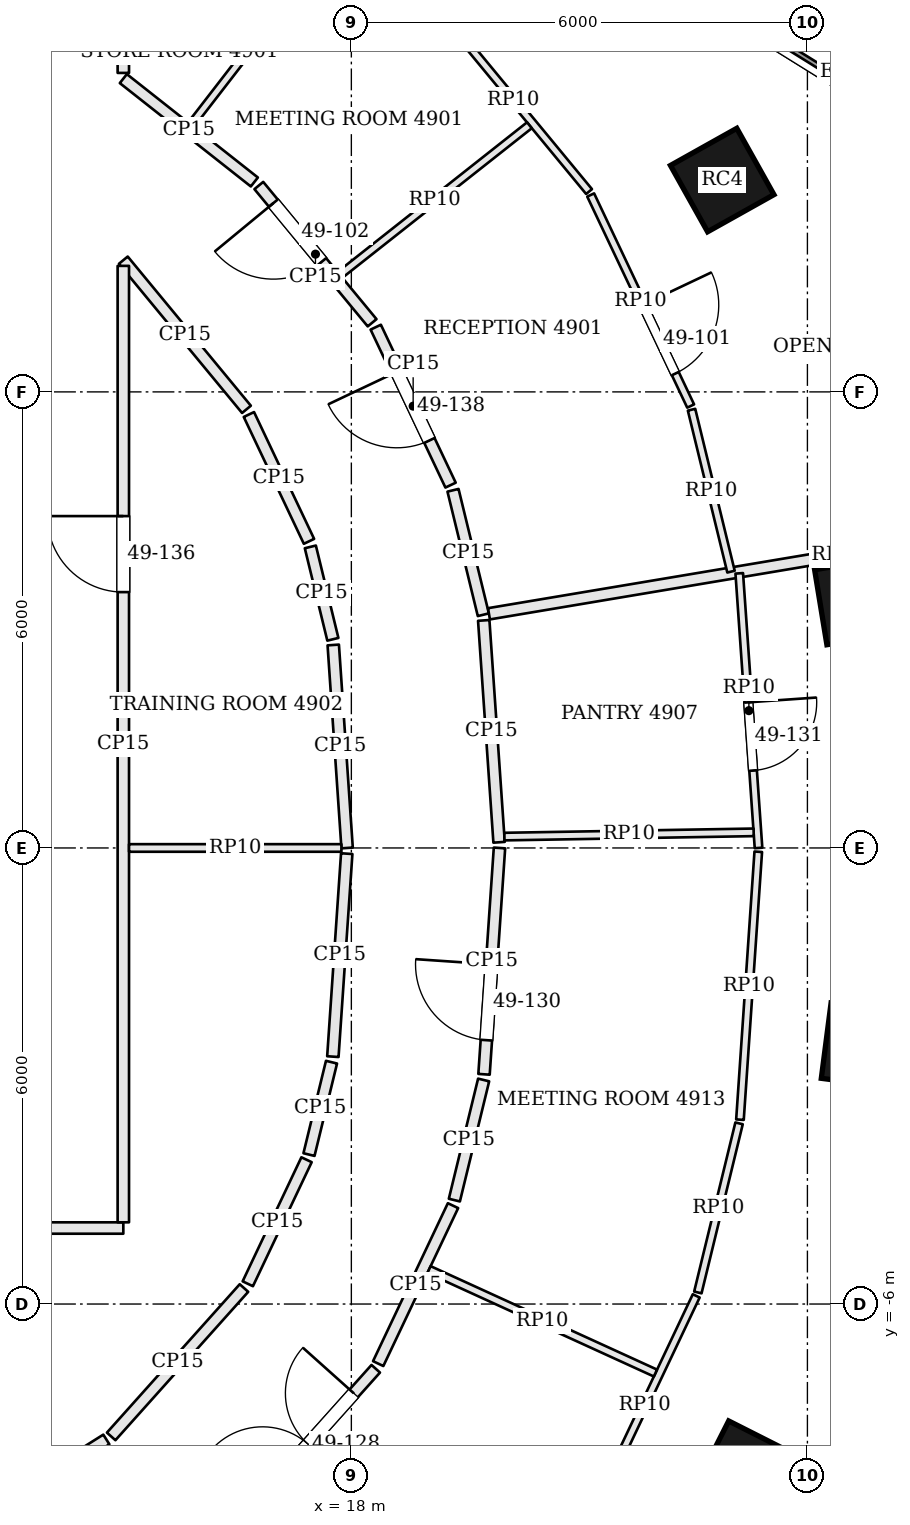
"""IFC4 building model, lengths in metres.
Left out: names, types, materials, properties, quantities, classifications, styles, units other than length and angle.
Written with IfcOpenShell. Run it as: python <this file> out.ifc"""

import sys

from ifc_helpers import new_model, si_unit, direction, frame, frame_2d, origin, origin_2d, place, context, subcontext, project, spatial, rectangle, extrude, element, fill, save


model = new_model("IFC4")
c1 = context("Model", 3, precision=1e-05, world=origin(), true_north=direction((0.0, 1.0)))
c2 = subcontext(c1, "Body", "Model", "MODEL_VIEW")
j1 = project(units=[si_unit("LENGTHUNIT", "METRE"), si_unit("PLANEANGLEUNIT", "RADIAN")], contexts=[c1])
p1 = place(None, origin())
s1 = spatial("IfcSite", under=j1, at=p1, CompositionType="ELEMENT")
p2 = place(p1, origin())
s2 = spatial("IfcBuilding", under=s1, at=p2, CompositionType="ELEMENT")
p3 = place(p2, frame((0.0, 0.0, 201.3)))
s3 = spatial("IfcBuildingStorey", under=s2, at=p3, CompositionType="ELEMENT", Elevation=201.3)
for number, where, z_axis, x_axis in (
    (1, (24.669, 3.248, 0.0), (0.0, 0.0, 1.0), (-0.162, 0.987, 0.0)),
    (2, (22.879, 8.787, 0.0), (0.0, 0.0, 1.0), (-0.489, 0.873, 0.0)),
    (3, (23.185, -8.21, 0.0), (0.0, 0.0, 1.0), (0.451, 0.893, 0.0)),
    (4, (24.743, -2.599, 0.0), (0.0, 0.0, 1.0), (0.128, 0.992, 0.0)),
):
    element("IfcColumn", number, at=place(p3, frame(where, z_axis=z_axis, x_axis=x_axis)), inside=s3, PredefinedType="COLUMN", context=c2, shape_type="SweptSolid", body=[
        extrude(rectangle(XDim=1.0, YDim=1.0, at=origin_2d()), origin(), (0.0, 0.0, 1.0), 3.9),
    ])
p4 = place(p3, frame((27.016, 8.626, 0.0), z_axis=(0.0, 0.0, 1.0), x_axis=(-0.849198377377, 0.528073968172, 0.0)))
e5 = element("IfcWall", 5, at=p4, inside=s3, PredefinedType="SOLIDWALL", context=c2, shape_type="SweptSolid", body=[
    extrude(rectangle(XDim=5.99, YDim=0.45, at=frame_2d((2.995, 0.0))), origin(), (0.0, 0.0, 1.0), 3.7),
])
p5 = place(p4, frame((2.095, 0.0, 0.9)))
e6 = element("IfcOpeningElement", 6, at=p5, cuts=e5, PredefinedType="OPENING", context=c2, shape_type="SweptSolid", body=[
    extrude(rectangle(XDim=1.8, YDim=2.3, at=frame_2d((0.9, 1.15))), frame((0.0, 0.235, 0.0), z_axis=(0.0, -1.0, 0.0), x_axis=(1.0, 0.0, 0.0)), (0.0, 0.0, 1.0), 0.47),
])
p6 = place(p3, frame((26.965, 8.746, 3.9), z_axis=(0.0, 0.0, 1.0), x_axis=(-0.849203312007, 0.528066032686, 0.0)))
e7 = element("IfcWall", 7, at=p6, inside=s3, PredefinedType="PARAPET", context=c2, shape_type="SweptSolid", body=[
    extrude(rectangle(XDim=4.113, YDim=0.3, at=frame_2d((2.056, 0.0))), origin(), (0.0, 0.0, 1.0), 1.1),
])
p7 = place(p3, frame((19.736, 3.068, 0.0), z_axis=(0.0, 0.0, 1.0), x_axis=(-0.236736045641, 0.971574003715, 0.0)))
e8 = element("IfcWall", 8, at=p7, inside=s3, PredefinedType="PARTITIONING", context=c2, shape_type="SweptSolid", body=[
    extrude(rectangle(XDim=1.685, YDim=0.15, at=frame_2d((0.843, 0.0))), origin(), (0.0, 0.0, 1.0), 3.084),
])
p8 = place(p3, frame((19.305, 4.773, 0.0), z_axis=(0.0, 0.0, 1.0), x_axis=(-0.428173054138, 0.903696760927, 0.0)))
e9 = element("IfcWall", 9, at=p8, inside=s3, PredefinedType="PARTITIONING", context=c2, shape_type="SweptSolid", body=[
    extrude(rectangle(XDim=2.3, YDim=0.15, at=frame_2d((1.15, 0.0))), origin(), (0.0, 0.0, 1.0), 3.084),
])
p9 = place(p8, frame((0.65, 0.0, 0.0)))
e10 = element("IfcOpeningElement", 10, at=p9, cuts=e9, PredefinedType="OPENING", context=c2, shape_type="SweptSolid", body=[
    extrude(rectangle(XDim=1.0, YDim=2.1, at=frame_2d((0.5, 1.05))), frame((0.0, 0.085, 0.0), z_axis=(0.0, -1.0, 0.0), x_axis=(1.0, 0.0, 0.0)), (0.0, 0.0, 1.0), 0.17),
])
p10 = place(p3, frame((18.273, 6.909, 0.0), z_axis=(0.0, 0.0, 1.0), x_axis=(-0.63653648943, 0.771246586783, 0.0)))
e11 = element("IfcWall", 11, at=p10, inside=s3, PredefinedType="PARTITIONING", context=c2, shape_type="SweptSolid", body=[
    extrude(rectangle(XDim=2.342, YDim=0.15, at=frame_2d((1.171, 0.0))), origin(), (0.0, 0.0, 1.0), 3.084),
])
p11 = place(p10, frame((1.041, 0.0, 0.0)))
e12 = element("IfcOpeningElement", 12, at=p11, cuts=e11, PredefinedType="OPENING", context=c2, shape_type="SweptSolid", body=[
    extrude(rectangle(XDim=1.0, YDim=2.4, at=frame_2d((0.5, 1.2))), frame((0.0, 0.085, 0.0), z_axis=(0.0, -1.0, 0.0), x_axis=(1.0, 0.0, 0.0)), (0.0, 0.0, 1.0), 0.17),
])
p12 = place(p3, frame((16.724, 8.761, 0.0), z_axis=(0.0, 0.0, 1.0), x_axis=(-0.785124633057, 0.619337800047, 0.0)))
e13 = element("IfcWall", 13, at=p12, inside=s3, PredefinedType="PARTITIONING", context=c2, shape_type="SweptSolid", body=[
    extrude(rectangle(XDim=2.196, YDim=0.15, at=frame_2d((1.098, 0.0))), origin(), (0.0, 0.0, 1.0), 3.084),
])
p13 = place(p3, frame((15.0, 10.196, 0.0), z_axis=(0.0, 0.0, 1.0), x_axis=(0.0, 1.0, 0.0)))
e14 = element("IfcWall", 14, at=p13, inside=s3, PredefinedType="PARTITIONING", context=c2, shape_type="SweptSolid", body=[
    extrude(rectangle(XDim=3.804, YDim=0.15, at=frame_2d((1.902, 0.0))), origin(), (0.0, 0.0, 1.0), 3.084),
])
p14 = place(p13, frame((1.097, 0.0, 0.0)))
e15 = element("IfcOpeningElement", 15, at=p14, cuts=e14, PredefinedType="OPENING", context=c2, shape_type="SweptSolid", body=[
    extrude(rectangle(XDim=1.0, YDim=2.4, at=frame_2d((0.5, 1.2))), frame((0.0, 0.085, 0.0), z_axis=(0.0, -1.0, 0.0), x_axis=(1.0, 0.0, 0.0)), (0.0, 0.0, 1.0), 0.17),
])
p15 = place(p3, frame((28.982, 4.62, 0.0), z_axis=(0.0, 0.0, 1.0), x_axis=(-0.986215974775, -0.165463141211, 0.0)))
e16 = element("IfcWall", 16, at=p15, inside=s3, PredefinedType="PARTITIONING", context=c2, shape_type="SweptSolid", body=[
    extrude(rectangle(XDim=9.3, YDim=0.15, at=frame_2d((4.65, 0.0))), origin(), (0.0, 0.0, 1.0), 3.084),
])
p16 = place(p3, frame((16.332, -9.074, 0.0), z_axis=(0.0, 0.0, 1.0), x_axis=(0.666900122351, 0.74514711756, 0.0)))
e17 = element("IfcWall", 17, at=p16, inside=s3, PredefinedType="PARTITIONING", context=c2, shape_type="SweptSolid", body=[
    extrude(rectangle(XDim=2.983, YDim=0.15, at=frame_2d((1.491, 0.0))), origin(), (0.0, 0.0, 1.0), 3.084),
])
p17 = place(p16, frame((0.75, 0.0, 0.0)))
e18 = element("IfcOpeningElement", 18, at=p17, cuts=e17, PredefinedType="OPENING", context=c2, shape_type="SweptSolid", body=[
    extrude(rectangle(XDim=1.8, YDim=2.1, at=frame_2d((0.9, 1.05))), frame((0.0, 0.085, 0.0), z_axis=(0.0, -1.0, 0.0), x_axis=(1.0, 0.0, 0.0)), (0.0, 0.0, 1.0), 0.17),
])
p18 = place(p3, frame((18.353, -6.784, 0.0), z_axis=(0.0, 0.0, 1.0), x_axis=(0.428086344739, 0.903737838894, 0.0)))
e19 = element("IfcWall", 19, at=p18, inside=s3, PredefinedType="PARTITIONING", context=c2, shape_type="SweptSolid", body=[
    extrude(rectangle(XDim=2.3, YDim=0.15, at=frame_2d((1.15, 0.0))), origin(), (0.0, 0.0, 1.0), 3.084),
])
p19 = place(p3, frame((19.355, -4.633, 0.0), z_axis=(0.0, 0.0, 1.0), x_axis=(0.236703930685, 0.971581828359, 0.0)))
e20 = element("IfcWall", 20, at=p19, inside=s3, PredefinedType="PARTITIONING", context=c2, shape_type="SweptSolid", body=[
    extrude(rectangle(XDim=1.626, YDim=0.15, at=frame_2d((0.813, 0.0))), origin(), (0.0, 0.0, 1.0), 3.084),
])
p20 = place(p3, frame((19.745, -2.978, 0.0), z_axis=(0.0, 0.0, 1.0), x_axis=(0.068142324, 0.997675610447, 0.0)))
e21 = element("IfcWall", 21, at=p20, inside=s3, PredefinedType="PARTITIONING", context=c2, shape_type="SweptSolid", body=[
    extrude(rectangle(XDim=2.984, YDim=0.15, at=frame_2d((1.492, 0.0))), origin(), (0.0, 0.0, 1.0), 3.084),
])
p21 = place(p20, frame((0.45, 0.0, 0.0)))
e22 = element("IfcOpeningElement", 22, at=p21, cuts=e21, PredefinedType="OPENING", context=c2, shape_type="SweptSolid", body=[
    extrude(rectangle(XDim=1.0, YDim=2.4, at=frame_2d((0.5, 1.2))), frame((0.0, 0.085, 0.0), z_axis=(0.0, -1.0, 0.0), x_axis=(1.0, 0.0, 0.0)), (0.0, 0.0, 1.0), 0.17),
])
p22 = place(p3, frame((19.944, 0.075, 0.0), z_axis=(0.0, 0.0, 1.0), x_axis=(-0.069011153465, 0.997615888355, 0.0)))
e23 = element("IfcWall", 23, at=p22, inside=s3, PredefinedType="PARTITIONING", context=c2, shape_type="SweptSolid", body=[
    extrude(rectangle(XDim=2.926, YDim=0.15, at=frame_2d((1.463, 0.0))), origin(), (0.0, 0.0, 1.0), 3.084),
])
p23 = place(p3, frame((15.0, 7.733, 0.0), z_axis=(0.0, 0.0, 1.0), x_axis=(0.636601263488, -0.771193121938, 0.0)))
e24 = element("IfcWall", 24, at=p23, inside=s3, PredefinedType="PARTITIONING", context=c2, shape_type="SweptSolid", body=[
    extrude(rectangle(XDim=2.545, YDim=0.15, at=frame_2d((1.272, 0.0))), origin(), (0.0, 0.0, 1.0), 3.084),
])
p24 = place(p3, frame((16.652, 5.702, 0.0), z_axis=(0.0, 0.0, 1.0), x_axis=(0.428126129773, -0.903718992279, 0.0)))
e25 = element("IfcWall", 25, at=p24, inside=s3, PredefinedType="PARTITIONING", context=c2, shape_type="SweptSolid", body=[
    extrude(rectangle(XDim=1.846, YDim=0.15, at=frame_2d((0.923, 0.0))), origin(), (0.0, 0.0, 1.0), 3.084),
])
p25 = place(p3, frame((17.46, 3.961, 0.0), z_axis=(0.0, 0.0, 1.0), x_axis=(0.236655249498, -0.971593687137, 0.0)))
e26 = element("IfcWall", 26, at=p25, inside=s3, PredefinedType="PARTITIONING", context=c2, shape_type="SweptSolid", body=[
    extrude(rectangle(XDim=1.251, YDim=0.15, at=frame_2d((0.626, 0.0))), origin(), (0.0, 0.0, 1.0), 3.084),
])
p26 = place(p3, frame((17.762, 2.67, 0.0), z_axis=(0.0, 0.0, 1.0), x_axis=(0.068135311644, -0.997676089373, 0.0)))
e27 = element("IfcWall", 27, at=p26, inside=s3, PredefinedType="PARTITIONING", context=c2, shape_type="SweptSolid", body=[
    extrude(rectangle(XDim=2.677, YDim=0.15, at=frame_2d((1.338, 0.0))), origin(), (0.0, 0.0, 1.0), 3.084),
])
p27 = place(p3, frame((17.939, -0.075, 0.0), z_axis=(0.0, 0.0, 1.0), x_axis=(-0.068226099283, -0.99766988497, 0.0)))
e28 = element("IfcWall", 28, at=p27, inside=s3, PredefinedType="PARTITIONING", context=c2, shape_type="SweptSolid", body=[
    extrude(rectangle(XDim=2.677, YDim=0.15, at=frame_2d((1.338, 0.0))), origin(), (0.0, 0.0, 1.0), 3.084),
])
p28 = place(p3, frame((17.739, -2.818, 0.0), z_axis=(0.0, 0.0, 1.0), x_axis=(-0.236884307907, -0.971537865792, 0.0)))
e29 = element("IfcWall", 29, at=p28, inside=s3, PredefinedType="PARTITIONING", context=c2, shape_type="SweptSolid", body=[
    extrude(rectangle(XDim=1.251, YDim=0.15, at=frame_2d((0.625, 0.0))), origin(), (0.0, 0.0, 1.0), 3.084),
])
p29 = place(p3, frame((17.41, -4.102, 0.0), z_axis=(0.0, 0.0, 1.0), x_axis=(-0.428074720318, -0.903743345107, 0.0)))
e30 = element("IfcWall", 30, at=p29, inside=s3, PredefinedType="PARTITIONING", context=c2, shape_type="SweptSolid", body=[
    extrude(rectangle(XDim=1.806, YDim=0.15, at=frame_2d((0.903, 0.0))), origin(), (0.0, 0.0, 1.0), 3.084),
])
p30 = place(p3, frame((16.587, -5.789, 0.0), z_axis=(0.0, 0.0, 1.0), x_axis=(-0.666887460656, -0.745158449472, 0.0)))
e31 = element("IfcWall", 31, at=p30, inside=s3, PredefinedType="PARTITIONING", context=c2, shape_type="SweptSolid", body=[
    extrude(rectangle(XDim=2.62, YDim=0.15, at=frame_2d((1.31, 0.0))), origin(), (0.0, 0.0, 1.0), 3.084),
])
p31 = place(p3, frame((14.777, -7.781, 0.0), z_axis=(0.0, 0.0, 1.0), x_axis=(-0.846359741043, -0.532611667862, 0.0)))
e32 = element("IfcWall", 32, at=p31, inside=s3, PredefinedType="PARTITIONING", context=c2, shape_type="SweptSolid", body=[
    extrude(rectangle(XDim=2.987, YDim=0.15, at=frame_2d((1.494, 0.0))), origin(), (0.0, 0.0, 1.0), 3.084),
])
p32 = place(p3, frame((-14.925, -5.0, 0.0), z_axis=(0.0, 0.0, 1.0), x_axis=(1.0, 0.0, 0.0)))
e33 = element("IfcWall", 33, at=p32, inside=s3, PredefinedType="PARTITIONING", context=c2, shape_type="SweptSolid", body=[
    extrude(rectangle(XDim=29.925, YDim=0.15, at=frame_2d((14.962, 0.0))), origin(), (0.0, 0.0, 1.0), 3.084),
])
p33 = place(p32, frame((3.925, 0.0, 0.0)))
e34 = element("IfcOpeningElement", 34, at=p33, cuts=e33, PredefinedType="OPENING", context=c2, shape_type="SweptSolid", body=[
    extrude(rectangle(XDim=1.0, YDim=2.1, at=frame_2d((0.5, 1.05))), frame((0.0, 0.085, 0.0), z_axis=(0.0, -1.0, 0.0), x_axis=(1.0, 0.0, 0.0)), (0.0, 0.0, 1.0), 0.17),
])
p34 = place(p32, frame((14.025, 0.0, 0.0)))
e35 = element("IfcOpeningElement", 35, at=p34, cuts=e33, PredefinedType="OPENING", context=c2, shape_type="SweptSolid", body=[
    extrude(rectangle(XDim=1.8, YDim=2.1, at=frame_2d((0.9, 1.05))), frame((0.0, 0.085, 0.0), z_axis=(0.0, -1.0, 0.0), x_axis=(1.0, 0.0, 0.0)), (0.0, 0.0, 1.0), 0.17),
])
p35 = place(p32, frame((24.925, 0.0, 0.0)))
e36 = element("IfcOpeningElement", 36, at=p35, cuts=e33, PredefinedType="OPENING", context=c2, shape_type="SweptSolid", body=[
    extrude(rectangle(XDim=1.0, YDim=2.1, at=frame_2d((0.5, 1.05))), frame((0.0, 0.085, 0.0), z_axis=(0.0, -1.0, 0.0), x_axis=(1.0, 0.0, 0.0)), (0.0, 0.0, 1.0), 0.17),
])
p36 = place(p3, frame((15.0, -4.925, 0.0), z_axis=(0.0, 0.0, 1.0), x_axis=(0.0, 1.0, 0.0)))
e37 = element("IfcWall", 37, at=p36, inside=s3, PredefinedType="PARTITIONING", context=c2, shape_type="SweptSolid", body=[
    extrude(rectangle(XDim=12.583, YDim=0.15, at=frame_2d((6.292, 0.0))), origin(), (0.0, 0.0, 1.0), 3.084),
])
p37 = place(p36, frame((8.291, 0.0, 0.0)))
e38 = element("IfcOpeningElement", 38, at=p37, cuts=e37, PredefinedType="OPENING", context=c2, shape_type="SweptSolid", body=[
    extrude(rectangle(XDim=1.0, YDim=2.1, at=frame_2d((0.5, 1.05))), frame((0.0, 0.085, 0.0), z_axis=(0.0, -1.0, 0.0), x_axis=(1.0, 0.0, 0.0)), (0.0, 0.0, 1.0), 0.17),
])
p38 = place(p3, frame((19.135, 11.049, 0.0), z_axis=(0.0, 0.0, 1.0), x_axis=(0.636562826748, -0.771224848927, 0.0)))
e39 = element("IfcWall", 39, at=p38, inside=s3, PredefinedType="PARTITIONING", context=c2, shape_type="SweptSolid", body=[
    extrude(rectangle(XDim=3.129, YDim=0.1, at=frame_2d((1.564, 0.0))), origin(), (0.0, 0.0, 1.0), 3.084),
])
p39 = place(p3, frame((21.149, 8.59, 0.0), z_axis=(0.0, 0.0, 1.0), x_axis=(0.428134173248, -0.903715181734, 0.0)))
e40 = element("IfcWall", 40, at=p39, inside=s3, PredefinedType="PARTITIONING", context=c2, shape_type="SweptSolid", body=[
    extrude(rectangle(XDim=3.072, YDim=0.1, at=frame_2d((1.536, 0.0))), origin(), (0.0, 0.0, 1.0), 3.084),
])
p40 = place(p39, frame((1.6, 0.0, 0.0)))
e41 = element("IfcOpeningElement", 41, at=p40, cuts=e40, PredefinedType="OPENING", context=c2, shape_type="SweptSolid", body=[
    extrude(rectangle(XDim=1.0, YDim=2.1, at=frame_2d((0.5, 1.05))), frame((0.0, 0.06, 0.0), z_axis=(0.0, -1.0, 0.0), x_axis=(1.0, 0.0, 0.0)), (0.0, 0.0, 1.0), 0.12),
])
p41 = place(p3, frame((22.476, 5.765, 0.0), z_axis=(0.0, 0.0, 1.0), x_axis=(0.23684595195, -0.971547217095, 0.0)))
e42 = element("IfcWall", 42, at=p41, inside=s3, PredefinedType="PARTITIONING", context=c2, shape_type="SweptSolid", body=[
    extrude(rectangle(XDim=2.193, YDim=0.1, at=frame_2d((1.096, 0.0))), origin(), (0.0, 0.0, 1.0), 3.084),
])
p42 = place(p3, frame((17.85, 7.54, 0.0), z_axis=(0.0, 0.0, 1.0), x_axis=(0.784835535168, 0.619704109021, 0.0)))
e43 = element("IfcWall", 43, at=p42, inside=s3, PredefinedType="PARTITIONING", context=c2, shape_type="SweptSolid", body=[
    extrude(rectangle(XDim=3.176, YDim=0.1, at=frame_2d((1.588, 0.0))), origin(), (0.0, 0.0, 1.0), 3.084),
])
p43 = place(p3, frame((15.89, 9.515, 0.0), z_axis=(0.0, 0.0, 1.0), x_axis=(0.611483217527, 0.791257401028, 0.0)))
e44 = element("IfcWall", 44, at=p43, inside=s3, PredefinedType="PARTITIONING", context=c2, shape_type="SweptSolid", body=[
    extrude(rectangle(XDim=3.891, YDim=0.1, at=frame_2d((1.945, 0.0))), origin(), (0.0, 0.0, 1.0), 3.084),
])
p44 = place(p3, frame((23.103, 3.613, 0.0), z_axis=(0.0, 0.0, 1.0), x_axis=(0.069972683226, -0.997548907875, 0.0)))
e45 = element("IfcWall", 45, at=p44, inside=s3, PredefinedType="PARTITIONING", context=c2, shape_type="SweptSolid", body=[
    extrude(rectangle(XDim=3.622, YDim=0.1, at=frame_2d((1.811, 0.0))), origin(), (0.0, 0.0, 1.0), 3.084),
])
p45 = place(p44, frame((1.701, 0.0, 0.0)))
e46 = element("IfcOpeningElement", 46, at=p45, cuts=e45, PredefinedType="OPENING", context=c2, shape_type="SweptSolid", body=[
    extrude(rectangle(XDim=0.9, YDim=2.1, at=frame_2d((0.45, 1.05))), frame((0.0, 0.06, 0.0), z_axis=(0.0, -1.0, 0.0), x_axis=(1.0, 0.0, 0.0)), (0.0, 0.0, 1.0), 0.12),
])
p46 = place(p3, frame((23.354, -0.05, 0.0), z_axis=(0.0, 0.0, 1.0), x_axis=(-0.06820679361, -0.99767120501, 0.0)))
e47 = element("IfcWall", 47, at=p46, inside=s3, PredefinedType="PARTITIONING", context=c2, shape_type="SweptSolid", body=[
    extrude(rectangle(XDim=3.533, YDim=0.1, at=frame_2d((1.767, 0.0))), origin(), (0.0, 0.0, 1.0), 3.084),
])
p47 = place(p3, frame((23.101, -3.623, 0.0), z_axis=(0.0, 0.0, 1.0), x_axis=(-0.236811358433, -0.971555649727, 0.0)))
e48 = element("IfcWall", 48, at=p47, inside=s3, PredefinedType="PARTITIONING", context=c2, shape_type="SweptSolid", body=[
    extrude(rectangle(XDim=2.29, YDim=0.1, at=frame_2d((1.145, 0.0))), origin(), (0.0, 0.0, 1.0), 3.084),
])
p48 = place(p3, frame((22.537, -5.893, 0.0), z_axis=(0.0, 0.0, 1.0), x_axis=(-0.428099612517, -0.903731554037, 0.0)))
e49 = element("IfcWall", 49, at=p48, inside=s3, PredefinedType="PARTITIONING", context=c2, shape_type="SweptSolid", body=[
    extrude(rectangle(XDim=3.164, YDim=0.1, at=frame_2d((1.582, 0.0))), origin(), (0.0, 0.0, 1.0), 3.084),
])
p49 = place(p3, frame((19.022, -5.547, 0.0), z_axis=(0.0, 0.0, 1.0), x_axis=(0.909573496754, -0.415543083209, 0.0)))
e50 = element("IfcWall", 50, at=p49, inside=s3, PredefinedType="PARTITIONING", context=c2, shape_type="SweptSolid", body=[
    extrude(rectangle(XDim=3.275, YDim=0.1, at=frame_2d((1.638, 0.0))), origin(), (0.0, 0.0, 1.0), 3.084),
])
p50 = place(p3, frame((20.014, 0.15, 0.0), z_axis=(0.0, 0.0, 1.0), x_axis=(0.999854678593, 0.017047630214, 0.0)))
e51 = element("IfcWall", 51, at=p50, inside=s3, PredefinedType="PARTITIONING", context=c2, shape_type="SweptSolid", body=[
    extrude(rectangle(XDim=3.28, YDim=0.1, at=frame_2d((1.64, 0.0))), origin(), (0.0, 0.0, 1.0), 3.084),
])
p51 = place(p3, frame((15.075, 0.0, 0.0), z_axis=(0.0, 0.0, 1.0), x_axis=(1.0, 0.0, 0.0)))
e52 = element("IfcWall", 52, at=p51, inside=s3, PredefinedType="PARTITIONING", context=c2, shape_type="SweptSolid", body=[
    extrude(rectangle(XDim=2.794, YDim=0.1, at=frame_2d((1.397, 0.0))), origin(), (0.0, 0.0, 1.0), 3.084),
])
p52 = place(p5, origin())
e53 = element("IfcWindow", 53, at=p52, inside=s3, PartitioningType="SINGLE_PANEL", PredefinedType="WINDOW", context=c2, shape_type="SweptSolid", body=[
    extrude(rectangle(XDim=1.8, YDim=2.3, at=frame_2d((0.9, 1.15))), frame((0.0, 0.135, 0.0), z_axis=(0.0, -1.0, 0.0), x_axis=(1.0, 0.0, 0.0)), (0.0, 0.0, 1.0), 0.06),
])
fill(e6, e53)
p53 = place(p40, origin())
e54 = element("IfcDoor", 54, at=p53, inside=s3, OperationType="SINGLE_SWING_LEFT", PredefinedType="DOOR", context=c2, shape_type="SweptSolid", body=[
    extrude(rectangle(XDim=1.0, YDim=2.1, at=frame_2d((0.5, 1.05))), frame((0.0, 0.025, 0.0), z_axis=(0.0, -1.0, 0.0), x_axis=(1.0, 0.0, 0.0)), (0.0, 0.0, 1.0), 0.05),
])
fill(e41, e54)
p54 = place(p11, origin())
e55 = element("IfcDoor", 55, at=p54, inside=s3, OperationType="SINGLE_SWING_RIGHT", PredefinedType="DOOR", context=c2, shape_type="SweptSolid", body=[
    extrude(rectangle(XDim=1.0, YDim=2.4, at=frame_2d((0.5, 1.2))), frame((0.0, 0.025, 0.0), z_axis=(0.0, -1.0, 0.0), x_axis=(1.0, 0.0, 0.0)), (0.0, 0.0, 1.0), 0.05),
])
fill(e12, e55)
p55 = place(p17, origin())
e56 = element("IfcDoor", 56, at=p55, inside=s3, OperationType="DOUBLE_DOOR_SINGLE_SWING", PredefinedType="DOOR", context=c2, shape_type="SweptSolid", body=[
    extrude(rectangle(XDim=1.8, YDim=2.1, at=frame_2d((0.9, 1.05))), frame((0.0, 0.025, 0.0), z_axis=(0.0, -1.0, 0.0), x_axis=(1.0, 0.0, 0.0)), (0.0, 0.0, 1.0), 0.05),
])
fill(e18, e56)
p56 = place(p21, origin())
e57 = element("IfcDoor", 57, at=p56, inside=s3, OperationType="SINGLE_SWING_RIGHT", PredefinedType="DOOR", context=c2, shape_type="SweptSolid", body=[
    extrude(rectangle(XDim=1.0, YDim=2.4, at=frame_2d((0.5, 1.2))), frame((0.0, 0.025, 0.0), z_axis=(0.0, -1.0, 0.0), x_axis=(1.0, 0.0, 0.0)), (0.0, 0.0, 1.0), 0.05),
])
fill(e22, e57)
p57 = place(p45, origin())
e58 = element("IfcDoor", 58, at=p57, inside=s3, OperationType="SINGLE_SWING_LEFT", PredefinedType="DOOR", context=c2, shape_type="SweptSolid", body=[
    extrude(rectangle(XDim=0.9, YDim=2.1, at=frame_2d((0.45, 1.05))), frame((0.0, 0.025, 0.0), z_axis=(0.0, -1.0, 0.0), x_axis=(1.0, 0.0, 0.0)), (0.0, 0.0, 1.0), 0.05),
])
fill(e46, e58)
p58 = place(p37, origin())
e59 = element("IfcDoor", 59, at=p58, inside=s3, OperationType="SINGLE_SWING_RIGHT", PredefinedType="DOOR", context=c2, shape_type="SweptSolid", body=[
    extrude(rectangle(XDim=1.0, YDim=2.1, at=frame_2d((0.5, 1.05))), frame((0.0, 0.025, 0.0), z_axis=(0.0, -1.0, 0.0), x_axis=(1.0, 0.0, 0.0)), (0.0, 0.0, 1.0), 0.05),
])
fill(e38, e59)
p59 = place(p9, origin())
e60 = element("IfcDoor", 60, at=p59, inside=s3, OperationType="SINGLE_SWING_RIGHT", PredefinedType="DOOR", context=c2, shape_type="SweptSolid", body=[
    extrude(rectangle(XDim=1.0, YDim=2.1, at=frame_2d((0.5, 1.05))), frame((0.0, 0.025, 0.0), z_axis=(0.0, -1.0, 0.0), x_axis=(1.0, 0.0, 0.0)), (0.0, 0.0, 1.0), 0.05),
])
fill(e10, e60)
save(model, sys.argv[1])
